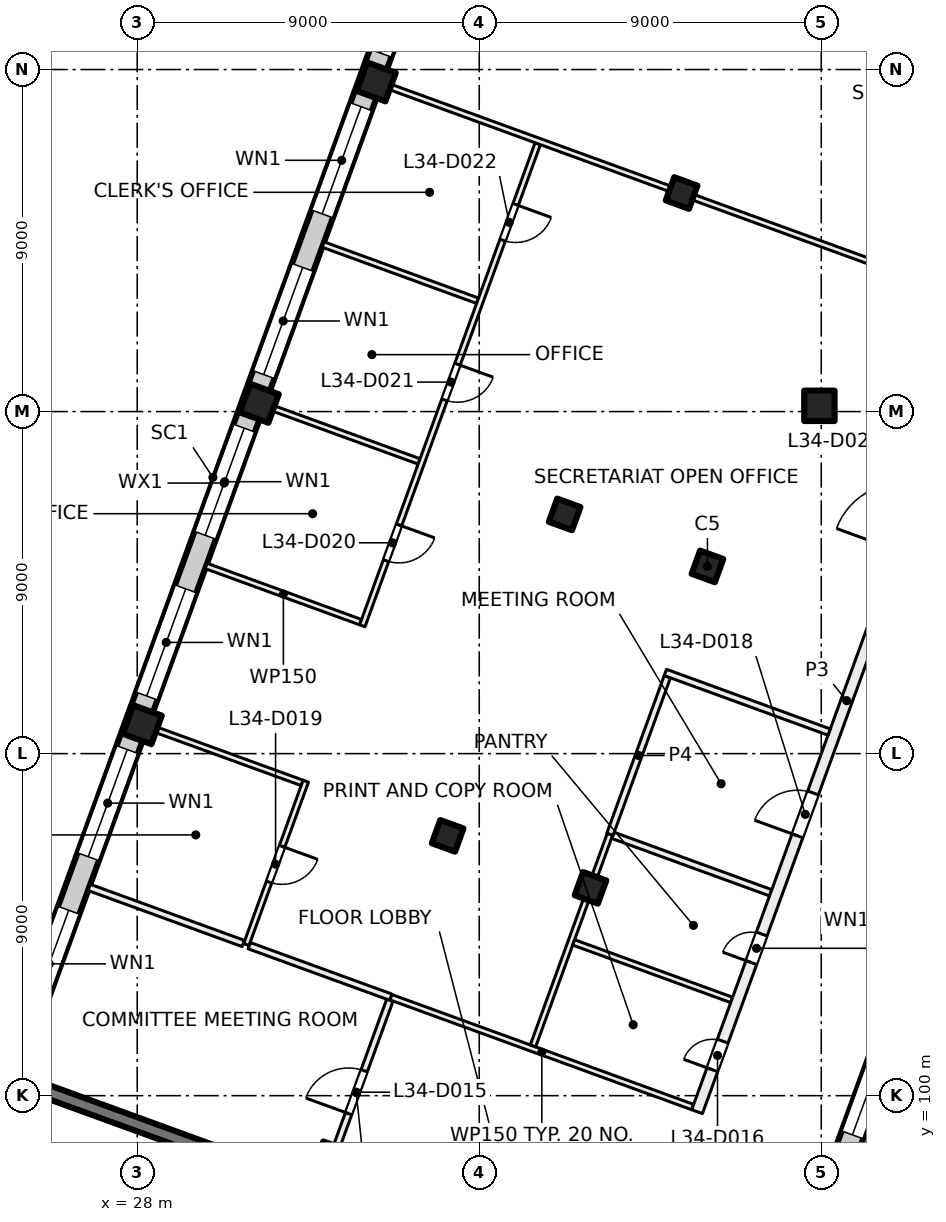
"""IFC4 building model, lengths in metres.
Left out: names, types, materials, properties, quantities, classifications, styles, units other than length and angle.
Written with IfcOpenShell. Run it as: python <this file> out.ifc"""

import sys

from ifc_helpers import new_model, si_unit, direction, frame, frame_2d, origin, origin_2d, place, context, subcontext, project, spatial, rectangle, extrude, element, fill, save


model = new_model("IFC4")
c1 = context("Model", 3, precision=1e-05, world=origin(), true_north=direction((0.0, 1.0)))
c2 = subcontext(c1, "Body", "Model", "MODEL_VIEW")
j1 = project(units=[si_unit("LENGTHUNIT", "METRE"), si_unit("PLANEANGLEUNIT", "RADIAN")], contexts=[c1])
p1 = place(None, origin())
s1 = spatial("IfcSite", under=j1, at=p1, CompositionType="ELEMENT")
p2 = place(p1, origin())
s2 = spatial("IfcBuilding", under=s1, at=p2, CompositionType="ELEMENT")
p3 = place(p2, frame((0.0, 0.0, 146.5)))
s3 = spatial("IfcBuildingStorey", under=s2, at=p3, CompositionType="ELEMENT", Elevation=146.5)
p4 = place(p3, frame((45.952, 118.152, 0.0), z_axis=(0.0, 0.0, 1.0), x_axis=(1.0, 0.0, 0.0)))
e1 = element("IfcColumn", 1, at=p4, inside=s3, PredefinedType="COLUMN", context=c2, shape_type="SweptSolid", body=[
    extrude(rectangle(XDim=0.8, YDim=0.8, at=origin_2d()), origin(), (0.0, 0.0, 1.0), 4.0),
])
for number, where, z_axis, x_axis in (
    (2, (43.006, 113.925, 0.0), (0.0, 0.0, 1.0), (-0.342, -0.94, 0.0)),
    (3, (39.927, 105.468, 0.0), (0.0, 0.0, 1.0), (-0.342, -0.94, 0.0)),
    (4, (42.325, 123.751, 0.0), (0.0, 0.0, 1.0), (-0.342, -0.94, 0.0)),
    (5, (39.247, 115.293, 0.0), (0.0, 0.0, 1.0), (-0.342, -0.94, 0.0)),
    (6, (36.169, 106.836, 0.0), (0.0, 0.0, 1.0), (-0.342, -0.94, 0.0)),
    (7, (33.091, 98.379, 0.0), (0.0, 0.0, 1.0), (-0.342, -0.94, 0.0)),
):
    element("IfcColumn", number, at=place(p3, frame(where, z_axis=z_axis, x_axis=x_axis)), inside=s3, PredefinedType="COLUMN", context=c2, shape_type="SweptSolid", body=[
        extrude(rectangle(XDim=0.65, YDim=0.65, at=origin_2d()), origin(), (0.0, 0.0, 1.0), 4.0),
    ])
for number, where, z_axis, x_axis in (
    (8, (34.291, 126.675, 0.0), (0.0, 0.0, 1.0), (-0.342, -0.94, 0.0)),
    (9, (31.212, 118.218, 0.0), (0.0, 0.0, 1.0), (-0.342, -0.94, 0.0)),
    (10, (28.134, 109.76, 0.0), (0.0, 0.0, 1.0), (-0.342, -0.94, 0.0)),
):
    element("IfcColumn", number, at=place(p3, frame(where, z_axis=z_axis, x_axis=x_axis)), inside=s3, PredefinedType="COLUMN", context=c2, shape_type="SweptSolid", body=[
        extrude(rectangle(XDim=0.8, YDim=0.8, at=origin_2d()), origin(), (0.0, 0.0, 1.0), 4.0),
    ])
p5 = place(p3, frame((32.962, 97.441, 0.0), z_axis=(0.0, 0.0, 1.0), x_axis=(-0.939689545667, 0.342028592028, 0.0)))
e11 = element("IfcWall", 11, at=p5, inside=s3, PredefinedType="SHEAR", context=c2, shape_type="SweptSolid", body=[
    extrude(rectangle(XDim=8.65, YDim=0.35, at=frame_2d((4.325, 0.0))), origin(), (0.0, 0.0, 1.0), 4.0),
])
p6 = place(p3, frame((52.212, 113.783, 0.0), z_axis=(0.0, 0.0, 1.0), x_axis=(-0.34202521188, -0.939690775968, 0.0)))
e12 = element("IfcWall", 12, at=p6, inside=s3, PredefinedType="SOLIDWALL", context=c2, shape_type="SweptSolid", body=[
    extrude(rectangle(XDim=21.745, YDim=0.6, at=frame_2d((10.873, 0.0))), origin(), (0.0, 0.0, 1.0), 3.625),
])
p7 = place(p6, frame((3.765, 0.0, 0.9)))
e13 = element("IfcOpeningElement", 13, at=p7, cuts=e12, PredefinedType="OPENING", context=c2, shape_type="SweptSolid", body=[
    extrude(rectangle(XDim=3.0, YDim=2.4, at=frame_2d((1.5, 1.2))), frame((0.0, 0.31, 0.0), z_axis=(0.0, -1.0, 0.0), x_axis=(1.0, 0.0, 0.0)), (0.0, 0.0, 1.0), 0.62),
])
p8 = place(p6, frame((8.265, 0.0, 0.9)))
e14 = element("IfcOpeningElement", 14, at=p8, cuts=e12, PredefinedType="OPENING", context=c2, shape_type="SweptSolid", body=[
    extrude(rectangle(XDim=3.0, YDim=2.4, at=frame_2d((1.5, 1.2))), frame((0.0, 0.31, 0.0), z_axis=(0.0, -1.0, 0.0), x_axis=(1.0, 0.0, 0.0)), (0.0, 0.0, 1.0), 0.62),
])
p9 = place(p6, frame((12.765, 0.0, 0.9)))
e15 = element("IfcOpeningElement", 15, at=p9, cuts=e12, PredefinedType="OPENING", context=c2, shape_type="SweptSolid", body=[
    extrude(rectangle(XDim=3.0, YDim=2.4, at=frame_2d((1.5, 1.2))), frame((0.0, 0.31, 0.0), z_axis=(0.0, -1.0, 0.0), x_axis=(1.0, 0.0, 0.0)), (0.0, 0.0, 1.0), 0.62),
])
p10 = place(p6, frame((17.265, 0.0, 0.9)))
e16 = element("IfcOpeningElement", 16, at=p10, cuts=e12, PredefinedType="OPENING", context=c2, shape_type="SweptSolid", body=[
    extrude(rectangle(XDim=3.0, YDim=2.4, at=frame_2d((1.5, 1.2))), frame((0.0, 0.31, 0.0), z_axis=(0.0, -1.0, 0.0), x_axis=(1.0, 0.0, 0.0)), (0.0, 0.0, 1.0), 0.62),
])
p11 = place(p3, frame((24.666, 100.669, 0.0), z_axis=(0.0, 0.0, 1.0), x_axis=(0.34201964167, 0.939692803373, 0.0)))
e17 = element("IfcWall", 17, at=p11, inside=s3, PredefinedType="SOLIDWALL", context=c2, shape_type="SweptSolid", body=[
    extrude(rectangle(XDim=32.884, YDim=0.6, at=frame_2d((16.442, 0.0))), origin(), (0.0, 0.0, 1.0), 3.625),
])
p12 = place(p11, frame((1.48, 0.0, 0.9)))
e18 = element("IfcOpeningElement", 18, at=p12, cuts=e17, PredefinedType="OPENING", context=c2, shape_type="SweptSolid", body=[
    extrude(rectangle(XDim=3.0, YDim=2.4, at=frame_2d((1.5, 1.2))), frame((0.0, 0.31, 0.0), z_axis=(0.0, -1.0, 0.0), x_axis=(1.0, 0.0, 0.0)), (0.0, 0.0, 1.0), 0.62),
])
p13 = place(p11, frame((5.98, 0.0, 0.9)))
e19 = element("IfcOpeningElement", 19, at=p13, cuts=e17, PredefinedType="OPENING", context=c2, shape_type="SweptSolid", body=[
    extrude(rectangle(XDim=3.0, YDim=2.4, at=frame_2d((1.5, 1.2))), frame((0.0, 0.31, 0.0), z_axis=(0.0, -1.0, 0.0), x_axis=(1.0, 0.0, 0.0)), (0.0, 0.0, 1.0), 0.62),
])
p14 = place(p11, frame((10.48, 0.0, 0.9)))
e20 = element("IfcOpeningElement", 20, at=p14, cuts=e17, PredefinedType="OPENING", context=c2, shape_type="SweptSolid", body=[
    extrude(rectangle(XDim=3.0, YDim=2.4, at=frame_2d((1.5, 1.2))), frame((0.0, 0.31, 0.0), z_axis=(0.0, -1.0, 0.0), x_axis=(1.0, 0.0, 0.0)), (0.0, 0.0, 1.0), 0.62),
])
p15 = place(p11, frame((14.98, 0.0, 0.9)))
e21 = element("IfcOpeningElement", 21, at=p15, cuts=e17, PredefinedType="OPENING", context=c2, shape_type="SweptSolid", body=[
    extrude(rectangle(XDim=3.0, YDim=2.4, at=frame_2d((1.5, 1.2))), frame((0.0, 0.31, 0.0), z_axis=(0.0, -1.0, 0.0), x_axis=(1.0, 0.0, 0.0)), (0.0, 0.0, 1.0), 0.62),
])
p16 = place(p11, frame((19.48, 0.0, 0.9)))
e22 = element("IfcOpeningElement", 22, at=p16, cuts=e17, PredefinedType="OPENING", context=c2, shape_type="SweptSolid", body=[
    extrude(rectangle(XDim=3.0, YDim=2.4, at=frame_2d((1.5, 1.2))), frame((0.0, 0.31, 0.0), z_axis=(0.0, -1.0, 0.0), x_axis=(1.0, 0.0, 0.0)), (0.0, 0.0, 1.0), 0.62),
])
p17 = place(p11, frame((23.98, 0.0, 0.9)))
e23 = element("IfcOpeningElement", 23, at=p17, cuts=e17, PredefinedType="OPENING", context=c2, shape_type="SweptSolid", body=[
    extrude(rectangle(XDim=3.0, YDim=2.4, at=frame_2d((1.5, 1.2))), frame((0.0, 0.31, 0.0), z_axis=(0.0, -1.0, 0.0), x_axis=(1.0, 0.0, 0.0)), (0.0, 0.0, 1.0), 0.62),
])
p18 = place(p11, frame((28.48, 0.0, 0.9)))
e24 = element("IfcOpeningElement", 24, at=p18, cuts=e17, PredefinedType="OPENING", context=c2, shape_type="SweptSolid", body=[
    extrude(rectangle(XDim=3.0, YDim=2.4, at=frame_2d((1.5, 1.2))), frame((0.0, 0.31, 0.0), z_axis=(0.0, -1.0, 0.0), x_axis=(1.0, 0.0, 0.0)), (0.0, 0.0, 1.0), 0.62),
])
p19 = place(p3, frame((26.736, 105.48, 0.0), z_axis=(0.0, 0.0, 1.0), x_axis=(0.939677739056, -0.342061027776, 0.0)))
e25 = element("IfcWall", 25, at=p19, inside=s3, PredefinedType="PARTITIONING", context=c2, shape_type="SweptSolid", body=[
    extrude(rectangle(XDim=4.315, YDim=0.175, at=frame_2d((2.158, 0.0))), origin(), (0.0, 0.0, 1.0), 3.625),
])
p20 = place(p3, frame((28.275, 109.709, 0.0), z_axis=(0.0, 0.0, 1.0), x_axis=(0.939737385516, -0.341897128188, 0.0)))
e26 = element("IfcWall", 26, at=p20, inside=s3, PredefinedType="PARTITIONING", context=c2, shape_type="SweptSolid", body=[
    extrude(rectangle(XDim=4.326, YDim=0.15, at=frame_2d((2.163, 0.0))), origin(), (0.0, 0.0, 1.0), 3.625),
])
p21 = place(p3, frame((30.95, 103.946, 0.0), z_axis=(0.0, 0.0, 1.0), x_axis=(0.939739492658, -0.341891336449, 0.0)))
e27 = element("IfcWall", 27, at=p21, inside=s3, PredefinedType="PARTITIONING", context=c2, shape_type="SweptSolid", body=[
    extrude(rectangle(XDim=3.966, YDim=0.175, at=frame_2d((1.983, 0.0))), origin(), (0.0, 0.0, 1.0), 3.625),
])
p22 = place(p3, frame((31.353, 118.166, 0.0), z_axis=(0.0, 0.0, 1.0), x_axis=(0.939803311208, -0.341715870634, 0.0)))
e28 = element("IfcWall", 28, at=p22, inside=s3, PredefinedType="PARTITIONING", context=c2, shape_type="SweptSolid", body=[
    extrude(rectangle(XDim=4.325, YDim=0.15, at=frame_2d((2.163, 0.0))), origin(), (0.0, 0.0, 1.0), 3.625),
])
p23 = place(p3, frame((32.436, 108.274, 0.0), z_axis=(0.0, 0.0, 1.0), x_axis=(-0.342145890874, -0.939646842893, 0.0)))
e29 = element("IfcWall", 29, at=p23, inside=s3, PredefinedType="PARTITIONING", context=c2, shape_type="SweptSolid", body=[
    extrude(rectangle(XDim=4.574, YDim=0.15, at=frame_2d((2.287, 0.0))), origin(), (0.0, 0.0, 1.0), 3.625),
])
p24 = place(p23, frame((1.824, 0.0, 0.0)))
e30 = element("IfcOpeningElement", 30, at=p24, cuts=e29, PredefinedType="OPENING", context=c2, shape_type="SweptSolid", body=[
    extrude(rectangle(XDim=1.0, YDim=2.1, at=frame_2d((0.5, 1.05))), frame((0.0, 0.085, 0.0), z_axis=(0.0, -1.0, 0.0), x_axis=(1.0, 0.0, 0.0)), (0.0, 0.0, 1.0), 0.17),
])
for number, where, z_axis, x_axis in (
    (31, (32.892, 122.395, 0.0), (0.0, 0.0, 1.0), (0.94, -0.342, 0.0)),
    (32, (33.879, 112.459, 0.0), (0.0, 0.0, 1.0), (-0.94, 0.342, 0.0)),
):
    element("IfcWall", number, at=place(p3, frame(where, z_axis=z_axis, x_axis=x_axis)), inside=s3, PredefinedType="PARTITIONING", context=c2, shape_type="SweptSolid", body=[
        extrude(rectangle(XDim=4.326, YDim=0.15, at=frame_2d((2.163, 0.0))), origin(), (0.0, 0.0, 1.0), 3.625),
    ])
p25 = place(p3, frame((38.54, 125.049, 0.0), z_axis=(0.0, 0.0, 1.0), x_axis=(-0.341994252555, -0.939702043852, 0.0)))
e33 = element("IfcWall", 33, at=p25, inside=s3, PredefinedType="PARTITIONING", context=c2, shape_type="SweptSolid", body=[
    extrude(rectangle(XDim=13.5, YDim=0.15, at=frame_2d((6.75, 0.0))), origin(), (0.0, 0.0, 1.0), 3.625),
])
p26 = place(p25, frame((10.675, 0.0, 0.0)))
e34 = element("IfcOpeningElement", 34, at=p26, cuts=e33, PredefinedType="OPENING", context=c2, shape_type="SweptSolid", body=[
    extrude(rectangle(XDim=1.0, YDim=2.1, at=frame_2d((0.5, 1.05))), frame((0.0, 0.085, 0.0), z_axis=(0.0, -1.0, 0.0), x_axis=(1.0, 0.0, 0.0)), (0.0, 0.0, 1.0), 0.17),
])
p27 = place(p25, frame((6.176, 0.0, 0.0)))
e35 = element("IfcOpeningElement", 35, at=p27, cuts=e33, PredefinedType="OPENING", context=c2, shape_type="SweptSolid", body=[
    extrude(rectangle(XDim=1.0, YDim=2.1, at=frame_2d((0.5, 1.05))), frame((0.0, 0.085, 0.0), z_axis=(0.0, -1.0, 0.0), x_axis=(1.0, 0.0, 0.0)), (0.0, 0.0, 1.0), 0.17),
])
p28 = place(p25, frame((1.703, 0.0, 0.0)))
e36 = element("IfcOpeningElement", 36, at=p28, cuts=e33, PredefinedType="OPENING", context=c2, shape_type="SweptSolid", body=[
    extrude(rectangle(XDim=1.0, YDim=2.1, at=frame_2d((0.5, 1.05))), frame((0.0, 0.085, 0.0), z_axis=(0.0, -1.0, 0.0), x_axis=(1.0, 0.0, 0.0)), (0.0, 0.0, 1.0), 0.17),
])
p29 = place(p3, frame((34.432, 126.624, 0.0), z_axis=(0.0, 0.0, 1.0), x_axis=(0.939664702396, -0.342096838733, 0.0)))
e37 = element("IfcWall", 37, at=p29, inside=s3, PredefinedType="PARTITIONING", context=c2, shape_type="SweptSolid", body=[
    extrude(rectangle(XDim=16.899, YDim=0.15, at=frame_2d((8.449, 0.0))), origin(), (0.0, 0.0, 1.0), 3.625),
])
p30 = place(p3, frame((32.881, 97.657, 0.0), z_axis=(0.0, 0.0, 1.0), x_axis=(0.342058204353, 0.939678766832, 0.0)))
e38 = element("IfcWall", 38, at=p30, inside=s3, PredefinedType="PARTITIONING", context=c2, shape_type="SweptSolid", body=[
    extrude(rectangle(XDim=5.163, YDim=0.175, at=frame_2d((2.581, 0.0))), origin(), (0.0, 0.0, 1.0), 3.625),
])
p31 = place(p30, frame((1.991, 0.0, 0.0)))
e39 = element("IfcOpeningElement", 39, at=p31, cuts=e38, PredefinedType="OPENING", context=c2, shape_type="SweptSolid", body=[
    extrude(rectangle(XDim=1.2, YDim=2.1, at=frame_2d((0.6, 1.05))), frame((0.0, 0.097, 0.0), z_axis=(0.0, -1.0, 0.0), x_axis=(1.0, 0.0, 0.0)), (0.0, 0.0, 1.0), 0.195),
])
p32 = place(p3, frame((34.677, 102.59, 0.0), z_axis=(0.0, 0.0, 1.0), x_axis=(0.939683705252, -0.342044637561, 0.0)))
e40 = element("IfcWall", 40, at=p32, inside=s3, PredefinedType="PARTITIONING", context=c2, shape_type="SweptSolid", body=[
    extrude(rectangle(XDim=8.45, YDim=0.15, at=frame_2d((4.225, 0.0))), origin(), (0.0, 0.0, 1.0), 3.625),
])
p33 = place(p3, frame((38.414, 101.309, 0.0), z_axis=(0.0, 0.0, 1.0), x_axis=(0.34186876189, 0.939747705315, 0.0)))
e41 = element("IfcWall", 41, at=p33, inside=s3, PredefinedType="PARTITIONING", context=c2, shape_type="SweptSolid", body=[
    extrude(rectangle(XDim=5.926, YDim=0.15, at=frame_2d((2.963, 0.0))), origin(), (0.0, 0.0, 1.0), 3.625),
])
p34 = place(p3, frame((39.484, 104.033, 0.0), z_axis=(0.0, 0.0, 1.0), x_axis=(0.939685474739, -0.342039776289, 0.0)))
e42 = element("IfcWall", 42, at=p34, inside=s3, PredefinedType="PARTITIONING", context=c2, shape_type="SweptSolid", body=[
    extrude(rectangle(XDim=4.426, YDim=0.15, at=frame_2d((2.213, 0.0))), origin(), (0.0, 0.0, 1.0), 3.625),
])
p35 = place(p3, frame((40.522, 106.848, 0.0), z_axis=(0.0, 0.0, 1.0), x_axis=(0.939646357962, -0.342147222654, 0.0)))
e43 = element("IfcWall", 43, at=p35, inside=s3, PredefinedType="PARTITIONING", context=c2, shape_type="SweptSolid", body=[
    extrude(rectangle(XDim=4.413, YDim=0.175, at=frame_2d((2.207, 0.0))), origin(), (0.0, 0.0, 1.0), 3.625),
])
p36 = place(p3, frame((41.95, 111.024, 0.0), z_axis=(0.0, 0.0, 1.0), x_axis=(-0.342218375959, -0.939620446327, 0.0)))
e44 = element("IfcWall", 44, at=p36, inside=s3, PredefinedType="PARTITIONING", context=c2, shape_type="SweptSolid", body=[
    extrude(rectangle(XDim=4.412, YDim=0.175, at=frame_2d((2.206, 0.0))), origin(), (0.0, 0.0, 1.0), 3.625),
])
p37 = place(p3, frame((42.732, 99.579, 0.0), z_axis=(0.0, 0.0, 1.0), x_axis=(0.342036000593, 0.939686849061, 0.0)))
e45 = element("IfcWall", 45, at=p37, inside=s3, PredefinedType="PARTITIONING", context=c2, shape_type="SweptSolid", body=[
    extrude(rectangle(XDim=23.018, YDim=0.3, at=frame_2d((11.509, 0.0))), origin(), (0.0, 0.0, 1.0), 3.625),
])
p38 = place(p37, frame((1.175, 0.0, 0.0)))
e46 = element("IfcOpeningElement", 46, at=p38, cuts=e45, PredefinedType="OPENING", context=c2, shape_type="SweptSolid", body=[
    extrude(rectangle(XDim=0.8, YDim=2.1, at=frame_2d((0.4, 1.05))), frame((0.0, 0.16, 0.0), z_axis=(0.0, -1.0, 0.0), x_axis=(1.0, 0.0, 0.0)), (0.0, 0.0, 1.0), 0.32),
])
p39 = place(p37, frame((4.175, 0.0, 0.0)))
e47 = element("IfcOpeningElement", 47, at=p39, cuts=e45, PredefinedType="OPENING", context=c2, shape_type="SweptSolid", body=[
    extrude(rectangle(XDim=0.8, YDim=2.1, at=frame_2d((0.4, 1.05))), frame((0.0, 0.16, 0.0), z_axis=(0.0, -1.0, 0.0), x_axis=(1.0, 0.0, 0.0)), (0.0, 0.0, 1.0), 0.32),
])
p40 = place(p37, frame((7.725, 0.0, 0.0)))
e48 = element("IfcOpeningElement", 48, at=p40, cuts=e45, PredefinedType="OPENING", context=c2, shape_type="SweptSolid", body=[
    extrude(rectangle(XDim=1.2, YDim=2.1, at=frame_2d((0.6, 1.05))), frame((0.0, 0.16, 0.0), z_axis=(0.0, -1.0, 0.0), x_axis=(1.0, 0.0, 0.0)), (0.0, 0.0, 1.0), 0.32),
])
p41 = place(p37, frame((15.675, 0.0, 0.0)))
e49 = element("IfcOpeningElement", 49, at=p41, cuts=e45, PredefinedType="OPENING", context=c2, shape_type="SweptSolid", body=[
    extrude(rectangle(XDim=1.8, YDim=2.1, at=frame_2d((0.9, 1.05))), frame((0.0, 0.16, 0.0), z_axis=(0.0, -1.0, 0.0), x_axis=(1.0, 0.0, 0.0)), (0.0, 0.0, 1.0), 0.32),
])
p42 = place(p3, frame((46.208, 109.567, 0.0), z_axis=(0.0, 0.0, 1.0), x_axis=(-0.939667480086, 0.342089208934, 0.0)))
e50 = element("IfcWall", 50, at=p42, inside=s3, PredefinedType="PARTITIONING", context=c2, shape_type="SweptSolid", body=[
    extrude(rectangle(XDim=4.587, YDim=0.175, at=frame_2d((2.293, 0.0))), origin(), (0.0, 0.0, 1.0), 3.625),
])
p43 = place(p9, origin())
e51 = element("IfcWindow", 51, at=p43, inside=s3, PartitioningType="SINGLE_PANEL", PredefinedType="WINDOW", context=c2, shape_type="SweptSolid", body=[
    extrude(rectangle(XDim=3.0, YDim=2.4, at=frame_2d((1.5, 1.2))), frame((0.0, 0.03, 0.0), z_axis=(0.0, -1.0, 0.0), x_axis=(1.0, 0.0, 0.0)), (0.0, 0.0, 1.0), 0.06),
])
fill(e15, e51)
p44 = place(p12, origin())
e52 = element("IfcWindow", 52, at=p44, inside=s3, PartitioningType="SINGLE_PANEL", PredefinedType="WINDOW", context=c2, shape_type="SweptSolid", body=[
    extrude(rectangle(XDim=3.0, YDim=2.4, at=frame_2d((1.5, 1.2))), frame((0.0, 0.03, 0.0), z_axis=(0.0, -1.0, 0.0), x_axis=(1.0, 0.0, 0.0)), (0.0, 0.0, 1.0), 0.06),
])
fill(e18, e52)
p45 = place(p13, origin())
e53 = element("IfcWindow", 53, at=p45, inside=s3, PartitioningType="SINGLE_PANEL", PredefinedType="WINDOW", context=c2, shape_type="SweptSolid", body=[
    extrude(rectangle(XDim=3.0, YDim=2.4, at=frame_2d((1.5, 1.2))), frame((0.0, 0.03, 0.0), z_axis=(0.0, -1.0, 0.0), x_axis=(1.0, 0.0, 0.0)), (0.0, 0.0, 1.0), 0.06),
])
fill(e19, e53)
p46 = place(p14, origin())
e54 = element("IfcWindow", 54, at=p46, inside=s3, PartitioningType="SINGLE_PANEL", PredefinedType="WINDOW", context=c2, shape_type="SweptSolid", body=[
    extrude(rectangle(XDim=3.0, YDim=2.4, at=frame_2d((1.5, 1.2))), frame((0.0, 0.03, 0.0), z_axis=(0.0, -1.0, 0.0), x_axis=(1.0, 0.0, 0.0)), (0.0, 0.0, 1.0), 0.06),
])
fill(e20, e54)
p47 = place(p15, origin())
e55 = element("IfcWindow", 55, at=p47, inside=s3, PartitioningType="SINGLE_PANEL", PredefinedType="WINDOW", context=c2, shape_type="SweptSolid", body=[
    extrude(rectangle(XDim=3.0, YDim=2.4, at=frame_2d((1.5, 1.2))), frame((0.0, 0.03, 0.0), z_axis=(0.0, -1.0, 0.0), x_axis=(1.0, 0.0, 0.0)), (0.0, 0.0, 1.0), 0.06),
])
fill(e21, e55)
p48 = place(p16, origin())
e56 = element("IfcWindow", 56, at=p48, inside=s3, PartitioningType="SINGLE_PANEL", PredefinedType="WINDOW", context=c2, shape_type="SweptSolid", body=[
    extrude(rectangle(XDim=3.0, YDim=2.4, at=frame_2d((1.5, 1.2))), frame((0.0, 0.03, 0.0), z_axis=(0.0, -1.0, 0.0), x_axis=(1.0, 0.0, 0.0)), (0.0, 0.0, 1.0), 0.06),
])
fill(e22, e56)
p49 = place(p17, origin())
e57 = element("IfcWindow", 57, at=p49, inside=s3, PartitioningType="SINGLE_PANEL", PredefinedType="WINDOW", context=c2, shape_type="SweptSolid", body=[
    extrude(rectangle(XDim=3.0, YDim=2.4, at=frame_2d((1.5, 1.2))), frame((0.0, 0.03, 0.0), z_axis=(0.0, -1.0, 0.0), x_axis=(1.0, 0.0, 0.0)), (0.0, 0.0, 1.0), 0.06),
])
fill(e23, e57)
p50 = place(p18, origin())
e58 = element("IfcWindow", 58, at=p50, inside=s3, PartitioningType="SINGLE_PANEL", PredefinedType="WINDOW", context=c2, shape_type="SweptSolid", body=[
    extrude(rectangle(XDim=3.0, YDim=2.4, at=frame_2d((1.5, 1.2))), frame((0.0, 0.03, 0.0), z_axis=(0.0, -1.0, 0.0), x_axis=(1.0, 0.0, 0.0)), (0.0, 0.0, 1.0), 0.06),
])
fill(e24, e58)
p51 = place(p31, origin())
e59 = element("IfcDoor", 59, at=p51, inside=s3, OperationType="DOUBLE_DOOR_SINGLE_SWING", PredefinedType="DOOR", context=c2, shape_type="SweptSolid", body=[
    extrude(rectangle(XDim=1.2, YDim=2.1, at=frame_2d((0.6, 1.05))), frame((0.0, 0.025, 0.0), z_axis=(0.0, -1.0, 0.0), x_axis=(1.0, 0.0, 0.0)), (0.0, 0.0, 1.0), 0.05),
])
fill(e39, e59)
p52 = place(p38, origin())
e60 = element("IfcDoor", 60, at=p52, inside=s3, OperationType="SINGLE_SWING_RIGHT", PredefinedType="DOOR", context=c2, shape_type="SweptSolid", body=[
    extrude(rectangle(XDim=0.8, YDim=2.1, at=frame_2d((0.4, 1.05))), frame((0.0, 0.025, 0.0), z_axis=(0.0, -1.0, 0.0), x_axis=(1.0, 0.0, 0.0)), (0.0, 0.0, 1.0), 0.05),
])
fill(e46, e60)
p53 = place(p39, origin())
e61 = element("IfcDoor", 61, at=p53, inside=s3, OperationType="SINGLE_SWING_LEFT", PredefinedType="DOOR", context=c2, shape_type="SweptSolid", body=[
    extrude(rectangle(XDim=0.8, YDim=2.1, at=frame_2d((0.4, 1.05))), frame((0.0, 0.025, 0.0), z_axis=(0.0, -1.0, 0.0), x_axis=(1.0, 0.0, 0.0)), (0.0, 0.0, 1.0), 0.05),
])
fill(e47, e61)
p54 = place(p40, origin())
e62 = element("IfcDoor", 62, at=p54, inside=s3, OperationType="DOUBLE_DOOR_SINGLE_SWING", PredefinedType="DOOR", context=c2, shape_type="SweptSolid", body=[
    extrude(rectangle(XDim=1.2, YDim=2.1, at=frame_2d((0.6, 1.05))), frame((0.0, 0.025, 0.0), z_axis=(0.0, -1.0, 0.0), x_axis=(1.0, 0.0, 0.0)), (0.0, 0.0, 1.0), 0.05),
])
fill(e48, e62)
p55 = place(p24, origin())
e63 = element("IfcDoor", 63, at=p55, inside=s3, OperationType="SINGLE_SWING_LEFT", PredefinedType="DOOR", context=c2, shape_type="SweptSolid", body=[
    extrude(rectangle(XDim=1.0, YDim=2.1, at=frame_2d((0.5, 1.05))), frame((0.0, 0.025, 0.0), z_axis=(0.0, -1.0, 0.0), x_axis=(1.0, 0.0, 0.0)), (0.0, 0.0, 1.0), 0.05),
])
fill(e30, e63)
p56 = place(p26, origin())
e64 = element("IfcDoor", 64, at=p56, inside=s3, OperationType="SINGLE_SWING_LEFT", PredefinedType="DOOR", context=c2, shape_type="SweptSolid", body=[
    extrude(rectangle(XDim=1.0, YDim=2.1, at=frame_2d((0.5, 1.05))), frame((0.0, 0.025, 0.0), z_axis=(0.0, -1.0, 0.0), x_axis=(1.0, 0.0, 0.0)), (0.0, 0.0, 1.0), 0.05),
])
fill(e34, e64)
p57 = place(p27, origin())
e65 = element("IfcDoor", 65, at=p57, inside=s3, OperationType="SINGLE_SWING_LEFT", PredefinedType="DOOR", context=c2, shape_type="SweptSolid", body=[
    extrude(rectangle(XDim=1.0, YDim=2.1, at=frame_2d((0.5, 1.05))), frame((0.0, 0.025, 0.0), z_axis=(0.0, -1.0, 0.0), x_axis=(1.0, 0.0, 0.0)), (0.0, 0.0, 1.0), 0.05),
])
fill(e35, e65)
p58 = place(p28, origin())
e66 = element("IfcDoor", 66, at=p58, inside=s3, OperationType="SINGLE_SWING_LEFT", PredefinedType="DOOR", context=c2, shape_type="SweptSolid", body=[
    extrude(rectangle(XDim=1.0, YDim=2.1, at=frame_2d((0.5, 1.05))), frame((0.0, 0.025, 0.0), z_axis=(0.0, -1.0, 0.0), x_axis=(1.0, 0.0, 0.0)), (0.0, 0.0, 1.0), 0.05),
])
fill(e36, e66)
save(model, sys.argv[1])
